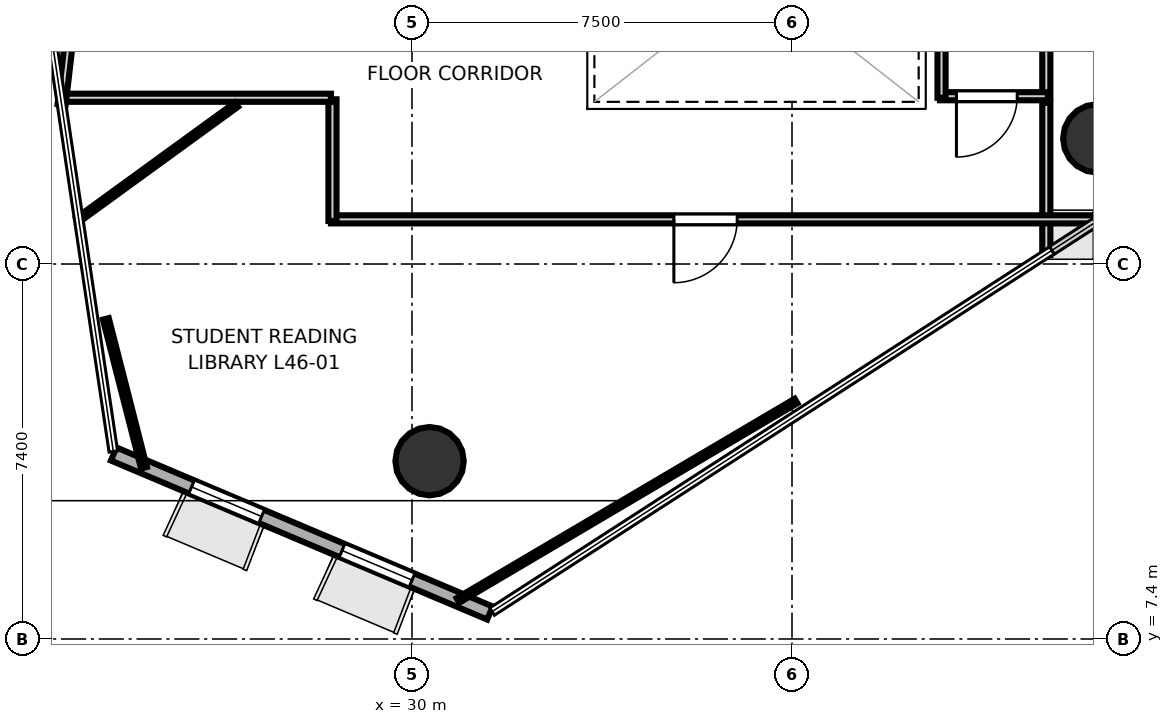
"""IFC4 building model, lengths in metres.
Left out: names, types, materials, properties, quantities, classifications, styles, units other than length and angle.
Written with IfcOpenShell. Run it as: python <this file> out.ifc"""

import sys

from ifc_helpers import new_model, si_unit, direction, frame, frame_2d, origin, origin_2d, place, context, subcontext, project, spatial, rectangle, hollow_circle, extrude, element, fill, save


model = new_model("IFC4")
c1 = context("Model", 3, precision=1e-05, world=origin(), true_north=direction((0.0, 1.0)))
c2 = subcontext(c1, "Body", "Model", "MODEL_VIEW")
j1 = project(units=[si_unit("LENGTHUNIT", "METRE"), si_unit("PLANEANGLEUNIT", "RADIAN")], contexts=[c1])
p1 = place(None, origin())
s1 = spatial("IfcSite", under=j1, at=p1, CompositionType="ELEMENT")
p2 = place(p1, origin())
s2 = spatial("IfcBuilding", under=s1, at=p2, CompositionType="ELEMENT")
p3 = place(p2, frame((0.0, 0.0, 180.9)))
s3 = spatial("IfcBuildingStorey", under=s2, at=p3, CompositionType="ELEMENT", Elevation=180.9)
for number, where, z_axis, x_axis in (
    (1, (30.347, 10.909, 0.0), (0.0, 0.0, 1.0), (1.0, 0.0, 0.0)),
    (2, (43.525, 17.279, 0.0), (0.0, 0.0, 1.0), (1.0, 0.0, 0.0)),
):
    element("IfcColumn", number, at=place(p3, frame(where, z_axis=z_axis, x_axis=x_axis)), inside=s3, PredefinedType="COLUMN", context=c2, shape_type="SweptSolid", body=[
        extrude(hollow_circle(Radius=0.675, WallThickness=0.032, at=origin_2d()), origin(), (0.0, 0.0, 1.0), 3.7),
    ])
p4 = place(p3, frame((24.113, 11.05, 0.0), z_axis=(0.0, 0.0, 1.0), x_axis=(0.921146063355, -0.389217073064, 0.0)))
e3 = element("IfcWall", 3, at=p4, inside=s3, PredefinedType="SOLIDWALL", context=c2, shape_type="SweptSolid", body=[
    extrude(rectangle(XDim=8.061, YDim=0.28, at=frame_2d((4.031, 0.0))), origin(), (0.0, 0.0, 1.0), 3.4),
])
p5 = place(p4, frame((1.668, 0.0, 0.85)))
e4 = element("IfcOpeningElement", 4, at=p5, cuts=e3, PredefinedType="OPENING", context=c2, shape_type="SweptSolid", body=[
    extrude(rectangle(XDim=1.5, YDim=2.1, at=frame_2d((0.75, 1.05))), frame((0.0, 0.15, 0.0), z_axis=(0.0, -1.0, 0.0), x_axis=(1.0, 0.0, 0.0)), (0.0, 0.0, 1.0), 0.3),
])
p6 = place(p4, frame((4.893, 0.0, 0.85)))
e5 = element("IfcOpeningElement", 5, at=p6, cuts=e3, PredefinedType="OPENING", context=c2, shape_type="SweptSolid", body=[
    extrude(rectangle(XDim=1.5, YDim=2.1, at=frame_2d((0.75, 1.05))), frame((0.0, 0.15, 0.0), z_axis=(0.0, -1.0, 0.0), x_axis=(1.0, 0.0, 0.0)), (0.0, 0.0, 1.0), 0.3),
])
p7 = place(p3, frame((42.519, 22.05, 0.0), z_axis=(0.0, 0.0, 1.0), x_axis=(0.0, -1.0, 0.0)))
e6 = element("IfcWall", 6, at=p7, inside=s3, PredefinedType="PARTITIONING", context=c2, shape_type="SweptSolid", body=[
    extrude(rectangle(XDim=3.97, YDim=0.16, at=frame_2d((1.985, 0.0))), origin(), (0.0, 0.0, 1.0), 2.72),
])
p8 = place(p7, frame((1.36, 0.0, 0.0)))
e7 = element("IfcOpeningElement", 7, at=p8, cuts=e6, PredefinedType="OPENING", context=c2, shape_type="SweptSolid", body=[
    extrude(rectangle(XDim=1.25, YDim=2.2, at=frame_2d((0.625, 1.1))), frame((0.0, 0.09, 0.0), z_axis=(0.0, -1.0, 0.0), x_axis=(1.0, 0.0, 0.0)), (0.0, 0.0, 1.0), 0.18),
])
p9 = place(p3, frame((42.55, 18.111, 0.0), z_axis=(0.0, 0.0, 1.0), x_axis=(-1.0, 0.0, 0.0)))
e8 = element("IfcWall", 8, at=p9, inside=s3, PredefinedType="PARTITIONING", context=c2, shape_type="SweptSolid", body=[
    extrude(rectangle(XDim=2.13, YDim=0.16, at=frame_2d((1.065, 0.0))), origin(), (0.0, 0.0, 1.0), 2.72),
])
p10 = place(p9, frame((0.605, 0.0, 0.0)))
e9 = element("IfcOpeningElement", 9, at=p10, cuts=e8, PredefinedType="OPENING", context=c2, shape_type="SweptSolid", body=[
    extrude(rectangle(XDim=1.2, YDim=2.15, at=frame_2d((0.6, 1.075))), frame((0.0, 0.09, 0.0), z_axis=(0.0, -1.0, 0.0), x_axis=(1.0, 0.0, 0.0)), (0.0, 0.0, 1.0), 0.18),
])
p11 = place(p3, frame((40.451, 18.08, 0.0), z_axis=(0.0, 0.0, 1.0), x_axis=(0.0, 1.0, 0.0)))
e10 = element("IfcWall", 10, at=p11, inside=s3, PredefinedType="PARTITIONING", context=c2, shape_type="SweptSolid", body=[
    extrude(rectangle(XDim=3.32, YDim=0.16, at=frame_2d((1.66, 0.0))), origin(), (0.0, 0.0, 1.0), 2.72),
])
p12 = place(p3, frame((42.519, 17.98, 0.0), z_axis=(0.0, 0.0, 1.0), x_axis=(0.0, -1.0, 0.0)))
e11 = element("IfcWall", 11, at=p12, inside=s3, PredefinedType="PARTITIONING", context=c2, shape_type="SweptSolid", body=[
    extrude(rectangle(XDim=3.002, YDim=0.16, at=frame_2d((1.501, 0.0))), origin(), (0.0, 0.0, 1.0), 2.72),
])
p13 = place(p3, frame((43.597, 15.681, 0.0), z_axis=(0.0, 0.0, 1.0), x_axis=(-1.0, 0.0, 0.0)))
e12 = element("IfcWall", 12, at=p13, inside=s3, PredefinedType="PARTITIONING", context=c2, shape_type="SweptSolid", body=[
    extrude(rectangle(XDim=15.197, YDim=0.16, at=frame_2d((7.599, 0.0))), origin(), (0.0, 0.0, 1.0), 2.72),
])
p14 = place(p13, frame((7.179, 0.0, 0.0)))
e13 = element("IfcOpeningElement", 13, at=p14, cuts=e12, PredefinedType="OPENING", context=c2, shape_type="SweptSolid", body=[
    extrude(rectangle(XDim=1.25, YDim=2.2, at=frame_2d((0.625, 1.1))), frame((0.0, 0.09, 0.0), z_axis=(0.0, -1.0, 0.0), x_axis=(1.0, 0.0, 0.0)), (0.0, 0.0, 1.0), 0.18),
])
p15 = place(p3, frame((28.431, 15.65, 0.0), z_axis=(0.0, 0.0, 1.0), x_axis=(0.0, 1.0, 0.0)))
e14 = element("IfcWall", 14, at=p15, inside=s3, PredefinedType="PARTITIONING", context=c2, shape_type="SweptSolid", body=[
    extrude(rectangle(XDim=2.4, YDim=0.16, at=frame_2d((1.2, 0.0))), origin(), (0.0, 0.0, 1.0), 2.72),
])
p16 = place(p3, frame((28.4, 18.081, 0.0), z_axis=(0.0, 0.0, 1.0), x_axis=(-1.0, 0.0, 0.0)))
e15 = element("IfcWall", 15, at=p16, inside=s3, PredefinedType="PARTITIONING", context=c2, shape_type="SweptSolid", body=[
    extrude(rectangle(XDim=5.355, YDim=0.16, at=frame_2d((2.677, 0.0))), origin(), (0.0, 0.0, 1.0), 2.72),
])
p17 = place(p3, frame((23.085, 17.946, 0.0), z_axis=(0.0, 0.0, 1.0), x_axis=(0.115005477672, 0.993364857495, 0.0)))
e16 = element("IfcWall", 16, at=p17, inside=s3, PredefinedType="PARTITIONING", context=c2, shape_type="SweptSolid", body=[
    extrude(rectangle(XDim=6.05, YDim=0.16, at=frame_2d((3.025, 0.0))), origin(), (0.0, 0.0, 1.0), 2.72),
])
p18 = place(p3, frame((37.58, 12.096, 0.0), z_axis=(0.0, 0.0, 1.0), x_axis=(-0.861345392408, -0.50801979782, 0.0)))
e17 = element("IfcWall", 17, at=p18, inside=s3, PredefinedType="PARTITIONING", context=c2, shape_type="SweptSolid", body=[
    extrude(rectangle(XDim=7.746, YDim=0.105, at=frame_2d((3.873, 0.0))), origin(), (0.0, 0.0, 1.0), 2.72),
])
p19 = place(p3, frame((24.711, 10.779, 0.0), z_axis=(0.0, 0.0, 1.0), x_axis=(-0.248100320036, 0.968734345008, 0.0)))
e18 = element("IfcWall", 18, at=p19, inside=s3, PredefinedType="PARTITIONING", context=c2, shape_type="SweptSolid", body=[
    extrude(rectangle(XDim=3.033, YDim=0.12, at=frame_2d((1.516, 0.0))), origin(), (0.0, 0.0, 1.0), 2.72),
])
p20 = place(p3, frame((23.407, 15.67, 0.0), z_axis=(0.0, 0.0, 1.0), x_axis=(0.809030640211, 0.587766469953, 0.0)))
e19 = element("IfcWall", 19, at=p20, inside=s3, PredefinedType="PARTITIONING", context=c2, shape_type="SweptSolid", body=[
    extrude(rectangle(XDim=3.87, YDim=0.105, at=frame_2d((1.935, 0.0))), origin(), (0.0, 0.0, 1.0), 2.72),
])
p21 = place(p10, origin())
e20 = element("IfcDoor", 20, at=p21, inside=s3, OperationType="SINGLE_SWING_RIGHT", PredefinedType="DOOR", context=c2, shape_type="SweptSolid", body=[
    extrude(rectangle(XDim=1.2, YDim=2.15, at=frame_2d((0.6, 1.075))), frame((0.0, 0.025, 0.0), z_axis=(0.0, -1.0, 0.0), x_axis=(1.0, 0.0, 0.0)), (0.0, 0.0, 1.0), 0.05),
])
fill(e9, e20)
p22 = place(p14, origin())
e21 = element("IfcDoor", 21, at=p22, inside=s3, OperationType="SINGLE_SWING_RIGHT", PredefinedType="DOOR", context=c2, shape_type="SweptSolid", body=[
    extrude(rectangle(XDim=1.25, YDim=2.2, at=frame_2d((0.625, 1.1))), frame((0.0, 0.025, 0.0), z_axis=(0.0, -1.0, 0.0), x_axis=(1.0, 0.0, 0.0)), (0.0, 0.0, 1.0), 0.05),
])
fill(e13, e21)
p23 = place(p5, origin())
e22 = element("IfcWindow", 22, at=p23, inside=s3, PartitioningType="SINGLE_PANEL", PredefinedType="WINDOW", context=c2, shape_type="SweptSolid", body=[
    extrude(rectangle(XDim=1.5, YDim=2.1, at=frame_2d((0.75, 1.05))), frame((0.0, 0.03, 0.0), z_axis=(0.0, -1.0, 0.0), x_axis=(1.0, 0.0, 0.0)), (0.0, 0.0, 1.0), 0.06),
])
fill(e4, e22)
p24 = place(p6, origin())
e23 = element("IfcWindow", 23, at=p24, inside=s3, PartitioningType="SINGLE_PANEL", PredefinedType="WINDOW", context=c2, shape_type="SweptSolid", body=[
    extrude(rectangle(XDim=1.5, YDim=2.1, at=frame_2d((0.75, 1.05))), frame((0.0, 0.03, 0.0), z_axis=(0.0, -1.0, 0.0), x_axis=(1.0, 0.0, 0.0)), (0.0, 0.0, 1.0), 0.06),
])
fill(e5, e23)
save(model, sys.argv[1])
